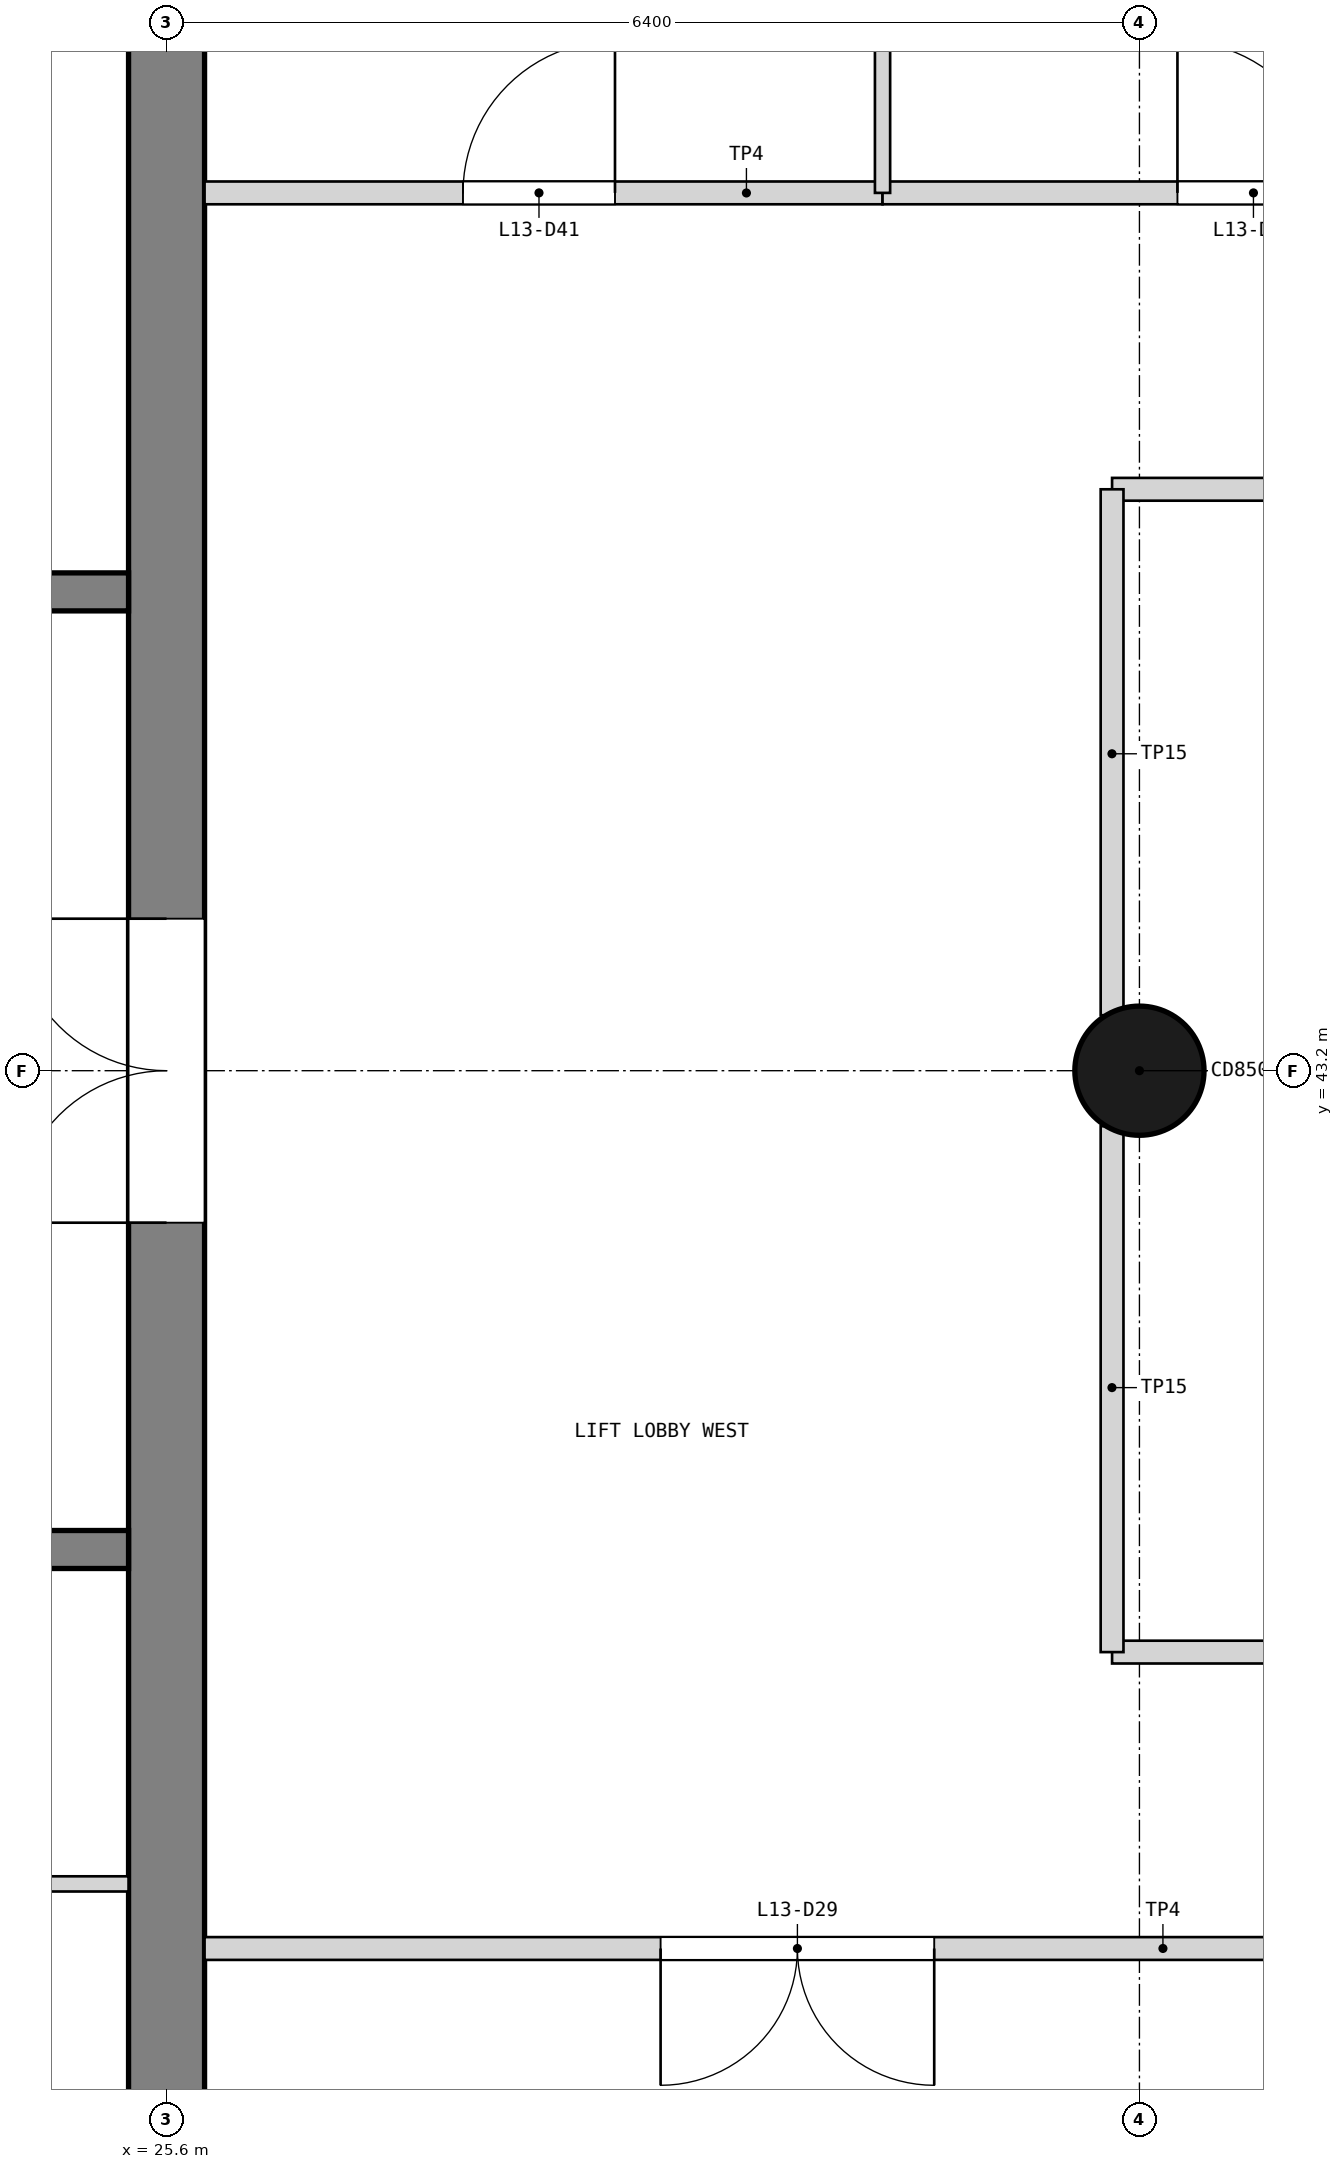
"""IFC4 building model, lengths in metres.
Left out: names, types, materials, properties, quantities, classifications, styles, units other than length and angle.
Written with IfcOpenShell. Run it as: python <this file> out.ifc"""

import sys

from ifc_helpers import new_model, si_unit, direction, frame, frame_2d, origin, origin_2d, place, context, subcontext, project, spatial, rectangle, circle, extrude, element, fill, save


model = new_model("IFC4")
c1 = context("Model", 3, precision=1e-05, world=origin(), true_north=direction((0.0, 1.0)))
c2 = subcontext(c1, "Body", "Model", "MODEL_VIEW")
j1 = project(units=[si_unit("LENGTHUNIT", "METRE"), si_unit("PLANEANGLEUNIT", "RADIAN")], contexts=[c1])
p1 = place(None, origin())
s1 = spatial("IfcSite", under=j1, at=p1, CompositionType="ELEMENT")
p2 = place(p1, origin())
s2 = spatial("IfcBuilding", under=s1, at=p2, CompositionType="ELEMENT")
p3 = place(p2, frame((0.0, 0.0, 52.2)))
s3 = spatial("IfcBuildingStorey", under=s2, at=p3, CompositionType="ELEMENT", Elevation=52.2)
p4 = place(p3, frame((25.6, 33.85, 0.0), z_axis=(0.0, 0.0, 1.0), x_axis=(0.0, 1.0, 0.0)))
e1 = element("IfcWall", 1, at=p4, inside=s3, PredefinedType="SHEAR", context=c2, shape_type="SweptSolid", body=[
    extrude(rectangle(XDim=18.7, YDim=0.5, at=frame_2d((9.35, 0.0))), origin(), (0.0, 0.0, 1.0), 3.9),
])
p5 = place(p4, frame((8.35, 0.0, 0.0)))
e2 = element("IfcOpeningElement", 2, at=p5, cuts=e1, PredefinedType="OPENING", context=c2, shape_type="SweptSolid", body=[
    extrude(rectangle(XDim=2.0, YDim=2.1, at=frame_2d((1.0, 1.05))), frame((0.0, 0.26, 0.0), z_axis=(0.0, -1.0, 0.0), x_axis=(1.0, 0.0, 0.0)), (0.0, 0.0, 1.0), 0.52),
])
p6 = place(p3, frame((32.0, 43.2, 0.0), z_axis=(0.0, 0.0, 1.0), x_axis=(1.0, 0.0, 0.0)))
e3 = element("IfcColumn", 3, at=p6, inside=s3, PredefinedType="COLUMN", context=c2, shape_type="SweptSolid", body=[
    extrude(circle(Radius=0.425, at=origin_2d()), origin(), (0.0, 0.0, 1.0), 3.9),
])
for number, where, z_axis, x_axis in (
    (4, (19.875, 40.05, 0.0), (0.0, 0.0, 1.0), (1.0, 0.0, 0.0)),
    (5, (19.875, 46.35, 0.0), (0.0, 0.0, 1.0), (1.0, 0.0, 0.0)),
):
    element("IfcWall", number, at=place(p3, frame(where, z_axis=z_axis, x_axis=x_axis)), inside=s3, PredefinedType="SOLIDWALL", context=c2, shape_type="SweptSolid", body=[
        extrude(rectangle(XDim=5.475, YDim=0.25, at=frame_2d((2.738, 0.0))), origin(), (0.0, 0.0, 1.0), 3.6),
    ])
p7 = place(p3, frame((21.675, 37.85, 0.0), z_axis=(0.0, 0.0, 1.0), x_axis=(1.0, 0.0, 0.0)))
e6 = element("IfcWall", 6, at=p7, inside=s3, PredefinedType="PARTITIONING", context=c2, shape_type="SweptSolid", body=[
    extrude(rectangle(XDim=3.675, YDim=0.1, at=frame_2d((1.837, 0.0))), origin(), (0.0, 0.0, 1.0), 3.6),
])
p8 = place(p3, frame((25.85, 37.425, 0.0), z_axis=(0.0, 0.0, 1.0), x_axis=(1.0, 0.0, 0.0)))
e7 = element("IfcWall", 7, at=p8, inside=s3, PredefinedType="PARTITIONING", context=c2, shape_type="SweptSolid", body=[
    extrude(rectangle(XDim=7.84, YDim=0.15, at=frame_2d((3.92, 0.0))), origin(), (0.0, 0.0, 1.0), 3.68),
])
p9 = place(p8, frame((3.0, 0.0, 0.0)))
e8 = element("IfcOpeningElement", 8, at=p9, cuts=e7, PredefinedType="OPENING", context=c2, shape_type="SweptSolid", body=[
    extrude(rectangle(XDim=1.8, YDim=2.1, at=frame_2d((0.9, 1.05))), frame((0.0, 0.085, 0.0), z_axis=(0.0, -1.0, 0.0), x_axis=(1.0, 0.0, 0.0)), (0.0, 0.0, 1.0), 0.17),
])
p10 = place(p3, frame((31.82, 39.375, 0.0), z_axis=(0.0, 0.0, 1.0), x_axis=(1.0, 0.0, 0.0)))
e9 = element("IfcWall", 9, at=p10, inside=s3, PredefinedType="PARTITIONING", context=c2, shape_type="SweptSolid", body=[
    extrude(rectangle(XDim=3.38, YDim=0.15, at=frame_2d((1.69, 0.0))), origin(), (0.0, 0.0, 1.0), 3.68),
])
p11 = place(p10, frame((1.18, 0.0, 0.0)))
e10 = element("IfcOpeningElement", 10, at=p11, cuts=e9, PredefinedType="OPENING", context=c2, shape_type="SweptSolid", body=[
    extrude(rectangle(XDim=1.0, YDim=2.1, at=frame_2d((0.5, 1.05))), frame((0.0, 0.085, 0.0), z_axis=(0.0, -1.0, 0.0), x_axis=(1.0, 0.0, 0.0)), (0.0, 0.0, 1.0), 0.17),
])
p12 = place(p3, frame((31.82, 47.025, 0.0), z_axis=(0.0, 0.0, 1.0), x_axis=(1.0, 0.0, 0.0)))
e11 = element("IfcWall", 11, at=p12, inside=s3, PredefinedType="PARTITIONING", context=c2, shape_type="SweptSolid", body=[
    extrude(rectangle(XDim=3.38, YDim=0.15, at=frame_2d((1.69, 0.0))), origin(), (0.0, 0.0, 1.0), 3.68),
])
p13 = place(p3, frame((25.85, 48.975, 0.0), z_axis=(0.0, 0.0, 1.0), x_axis=(1.0, 0.0, 0.0)))
e12 = element("IfcWall", 12, at=p13, inside=s3, PredefinedType="PARTITIONING", context=c2, shape_type="SweptSolid", body=[
    extrude(rectangle(XDim=4.46, YDim=0.15, at=frame_2d((2.23, 0.0))), origin(), (0.0, 0.0, 1.0), 3.68),
])
p14 = place(p13, frame((1.7, 0.0, 0.0)))
e13 = element("IfcOpeningElement", 13, at=p14, cuts=e12, PredefinedType="OPENING", context=c2, shape_type="SweptSolid", body=[
    extrude(rectangle(XDim=1.0, YDim=2.1, at=frame_2d((0.5, 1.05))), frame((0.0, 0.085, 0.0), z_axis=(0.0, -1.0, 0.0), x_axis=(1.0, 0.0, 0.0)), (0.0, 0.0, 1.0), 0.17),
])
p15 = place(p3, frame((30.31, 48.975, 0.0), z_axis=(0.0, 0.0, 1.0), x_axis=(1.0, 0.0, 0.0)))
e14 = element("IfcWall", 14, at=p15, inside=s3, PredefinedType="PARTITIONING", context=c2, shape_type="SweptSolid", body=[
    extrude(rectangle(XDim=4.89, YDim=0.15, at=frame_2d((2.445, 0.0))), origin(), (0.0, 0.0, 1.0), 3.68),
])
p16 = place(p15, frame((1.94, 0.0, 0.0)))
e15 = element("IfcOpeningElement", 15, at=p16, cuts=e14, PredefinedType="OPENING", context=c2, shape_type="SweptSolid", body=[
    extrude(rectangle(XDim=1.0, YDim=2.1, at=frame_2d((0.5, 1.05))), frame((0.0, 0.085, 0.0), z_axis=(0.0, -1.0, 0.0), x_axis=(1.0, 0.0, 0.0)), (0.0, 0.0, 1.0), 0.17),
])
p17 = place(p3, frame((30.31, 48.975, 0.0), z_axis=(0.0, 0.0, 1.0), x_axis=(0.0, 1.0, 0.0)))
e16 = element("IfcWall", 16, at=p17, inside=s3, PredefinedType="PARTITIONING", context=c2, shape_type="SweptSolid", body=[
    extrude(rectangle(XDim=6.125, YDim=0.1, at=frame_2d((3.062, 0.0))), origin(), (0.0, 0.0, 1.0), 3.68),
])
for number, where, z_axis, x_axis in (
    (17, (31.82, 39.375, 0.0), (0.0, 0.0, 1.0), (0.0, 1.0, 0.0)),
    (18, (31.82, 43.565, 0.0), (0.0, 0.0, 1.0), (0.0, 1.0, 0.0)),
):
    element("IfcWall", number, at=place(p3, frame(where, z_axis=z_axis, x_axis=x_axis)), inside=s3, PredefinedType="PARTITIONING", context=c2, shape_type="SweptSolid", body=[
        extrude(rectangle(XDim=3.46, YDim=0.15, at=frame_2d((1.73, 0.0))), origin(), (0.0, 0.0, 1.0), 2.78),
    ])
p18 = place(p5, origin())
e19 = element("IfcDoor", 19, at=p18, inside=s3, OperationType="DOUBLE_DOOR_SINGLE_SWING", PredefinedType="DOOR", context=c2, shape_type="SweptSolid", body=[
    extrude(rectangle(XDim=2.0, YDim=2.1, at=frame_2d((1.0, 1.05))), frame((0.0, 0.025, 0.0), z_axis=(0.0, -1.0, 0.0), x_axis=(1.0, 0.0, 0.0)), (0.0, 0.0, 1.0), 0.05),
])
fill(e2, e19)
p19 = place(p9, frame((1.8, 0.0, 0.0), z_axis=(0.0, 0.0, 1.0), x_axis=(-1.0, 0.0, 0.0)))
e20 = element("IfcDoor", 20, at=p19, inside=s3, OperationType="DOUBLE_DOOR_SINGLE_SWING", PredefinedType="DOOR", context=c2, shape_type="SweptSolid", body=[
    extrude(rectangle(XDim=1.8, YDim=2.1, at=frame_2d((0.9, 1.05))), frame((0.0, 0.025, 0.0), z_axis=(0.0, -1.0, 0.0), x_axis=(1.0, 0.0, 0.0)), (0.0, 0.0, 1.0), 0.05),
])
fill(e8, e20)
p20 = place(p14, origin())
e21 = element("IfcDoor", 21, at=p20, inside=s3, OperationType="SINGLE_SWING_RIGHT", PredefinedType="DOOR", context=c2, shape_type="SweptSolid", body=[
    extrude(rectangle(XDim=1.0, YDim=2.1, at=frame_2d((0.5, 1.05))), frame((0.0, 0.025, 0.0), z_axis=(0.0, -1.0, 0.0), x_axis=(1.0, 0.0, 0.0)), (0.0, 0.0, 1.0), 0.05),
])
fill(e13, e21)
p21 = place(p16, origin())
e22 = element("IfcDoor", 22, at=p21, inside=s3, OperationType="SINGLE_SWING_LEFT", PredefinedType="DOOR", context=c2, shape_type="SweptSolid", body=[
    extrude(rectangle(XDim=1.0, YDim=2.1, at=frame_2d((0.5, 1.05))), frame((0.0, 0.025, 0.0), z_axis=(0.0, -1.0, 0.0), x_axis=(1.0, 0.0, 0.0)), (0.0, 0.0, 1.0), 0.05),
])
fill(e15, e22)
save(model, sys.argv[1])
